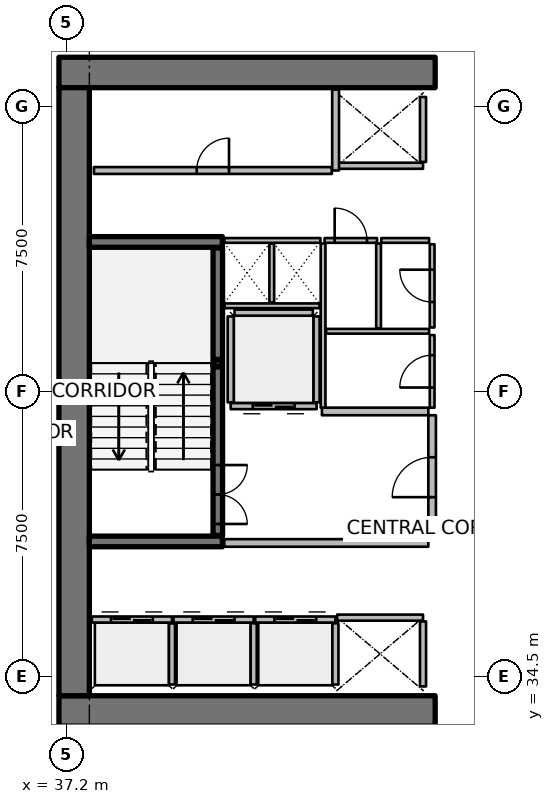
"""IFC4 building model, lengths in metres.
Left out: names, types, materials, properties, quantities, classifications, styles, units other than length and angle.
Written with IfcOpenShell. Run it as: python <this file> out.ifc"""

import sys

from ifc_helpers import new_model, si_unit, direction, frame, frame_2d, origin, origin_2d, place, context, subcontext, project, spatial, rectangle, hollow_rectangle, extrude, element, fill, save


model = new_model("IFC4")
c1 = context("Model", 3, precision=1e-05, world=origin(), true_north=direction((0.0, 1.0)))
c2 = subcontext(c1, "Body", "Model", "MODEL_VIEW")
j1 = project(units=[si_unit("LENGTHUNIT", "METRE"), si_unit("PLANEANGLEUNIT", "RADIAN")], contexts=[c1])
p1 = place(None, origin())
s1 = spatial("IfcSite", under=j1, at=p1, CompositionType="ELEMENT")
p2 = place(p1, origin())
s2 = spatial("IfcBuilding", under=s1, at=p2, CompositionType="ELEMENT")
p3 = place(p2, frame((0.0, 0.0, 75.15)))
s3 = spatial("IfcBuildingStorey", under=s2, at=p3, CompositionType="ELEMENT", Elevation=75.15)
for number, where, z_axis, x_axis in (
    (1, (37.0, 33.6, 0.0), (0.0, 0.0, 1.0), (1.0, 0.0, 0.0)),
    (2, (37.0, 50.4, 0.0), (0.0, 0.0, 1.0), (1.0, 0.0, 0.0)),
):
    element("IfcWall", number, at=place(p3, frame(where, z_axis=z_axis, x_axis=x_axis)), inside=s3, PredefinedType="SHEAR", context=c2, shape_type="SweptSolid", body=[
        extrude(rectangle(XDim=9.9, YDim=0.8, at=frame_2d((4.95, 0.0))), origin(), (0.0, 0.0, 1.0), 3.75),
    ])
p4 = place(p3, frame((37.4, 34.0, 0.0), z_axis=(0.0, 0.0, 1.0), x_axis=(0.0, 1.0, 0.0)))
e3 = element("IfcWall", 3, at=p4, inside=s3, PredefinedType="SHEAR", context=c2, shape_type="SweptSolid", body=[
    extrude(rectangle(XDim=16.0, YDim=0.8, at=frame_2d((8.0, 0.0))), origin(), (0.0, 0.0, 1.0), 3.75),
])
for number, where, z_axis, x_axis in (
    (4, (37.8, 38.06, 0.0), (0.0, 0.0, 1.0), (1.0, 0.0, 0.0)),
    (5, (37.8, 45.94, 0.0), (0.0, 0.0, 1.0), (1.0, 0.0, 0.0)),
):
    element("IfcWall", number, at=place(p3, frame(where, z_axis=z_axis, x_axis=x_axis)), inside=s3, PredefinedType="SHEAR", context=c2, shape_type="SweptSolid", body=[
        extrude(rectangle(XDim=3.5, YDim=0.28, at=frame_2d((1.75, 0.0))), origin(), (0.0, 0.0, 1.0), 3.75),
    ])
p5 = place(p3, frame((41.18, 42.75, 0.0), z_axis=(0.0, 0.0, 1.0), x_axis=(1.0, 0.0, 0.0)))
e6 = element("IfcColumn", 6, at=p5, inside=s3, PredefinedType="COLUMN", context=c2, shape_type="SweptSolid", body=[
    extrude(hollow_rectangle(XDim=0.2, YDim=0.2, WallThickness=0.01, InnerFilletRadius=0.01, OuterFilletRadius=0.02, at=origin_2d()), origin(), (0.0, 0.0, 1.0), 1.67),
])
p6 = place(p3, frame((41.18, 38.22, 0.0), z_axis=(0.0, 0.0, 1.0), x_axis=(0.0, 1.0, 0.0)))
e7 = element("IfcWall", 7, at=p6, inside=s3, PredefinedType="SOLIDWALL", context=c2, shape_type="SweptSolid", body=[
    extrude(rectangle(XDim=7.56, YDim=0.25, at=frame_2d((3.78, 0.0))), origin(), (0.0, 0.0, 1.0), 3.5),
])
p7 = place(p6, frame((0.3, 0.0, 0.0)))
e8 = element("IfcOpeningElement", 8, at=p7, cuts=e7, PredefinedType="OPENING", context=c2, shape_type="SweptSolid", body=[
    extrude(rectangle(XDim=1.55, YDim=2.15, at=frame_2d((0.775, 1.075))), frame((0.0, 0.135, 0.0), z_axis=(0.0, -1.0, 0.0), x_axis=(1.0, 0.0, 0.0)), (0.0, 0.0, 1.0), 0.27),
])
p8 = place(p3, frame((37.865, 36.005, 0.0), z_axis=(0.0, 0.0, 1.0), x_axis=(1.0, 0.0, 0.0)))
e9 = element("IfcWall", 9, at=p8, inside=s3, PredefinedType="PARTITIONING", context=c2, shape_type="SweptSolid", body=[
    extrude(rectangle(XDim=2.11, YDim=0.16, at=frame_2d((1.055, 0.0))), origin(), (0.0, 0.0, 1.0), 3.5),
])
p9 = place(p8, frame((0.505, 0.0, 0.0)))
e10 = element("IfcOpeningElement", 10, at=p9, cuts=e9, PredefinedType="OPENING", context=c2, shape_type="SweptSolid", body=[
    extrude(rectangle(XDim=1.1, YDim=2.1, at=frame_2d((0.55, 1.05))), frame((0.0, 0.09, 0.0), z_axis=(0.0, -1.0, 0.0), x_axis=(1.0, 0.0, 0.0)), (0.0, 0.0, 1.0), 0.18),
])
p10 = place(p3, frame((39.975, 34.295, 0.0), z_axis=(0.0, 0.0, 1.0), x_axis=(0.0, 1.0, 0.0)))
e11 = element("IfcWall", 11, at=p10, inside=s3, PredefinedType="PARTITIONING", context=c2, shape_type="SweptSolid", body=[
    extrude(rectangle(XDim=1.61, YDim=0.16, at=frame_2d((0.805, 0.0))), origin(), (0.0, 0.0, 1.0), 3.5),
])
p11 = place(p3, frame((40.015, 36.005, 0.0), z_axis=(0.0, 0.0, 1.0), x_axis=(1.0, 0.0, 0.0)))
e12 = element("IfcWall", 12, at=p11, inside=s3, PredefinedType="PARTITIONING", context=c2, shape_type="SweptSolid", body=[
    extrude(rectangle(XDim=2.11, YDim=0.16, at=frame_2d((1.055, 0.0))), origin(), (0.0, 0.0, 1.0), 3.5),
])
p12 = place(p11, frame((0.505, 0.0, 0.0)))
e13 = element("IfcOpeningElement", 13, at=p12, cuts=e12, PredefinedType="OPENING", context=c2, shape_type="SweptSolid", body=[
    extrude(rectangle(XDim=1.1, YDim=2.1, at=frame_2d((0.55, 1.05))), frame((0.0, 0.09, 0.0), z_axis=(0.0, -1.0, 0.0), x_axis=(1.0, 0.0, 0.0)), (0.0, 0.0, 1.0), 0.18),
])
p13 = place(p3, frame((42.125, 34.295, 0.0), z_axis=(0.0, 0.0, 1.0), x_axis=(0.0, 1.0, 0.0)))
e14 = element("IfcWall", 14, at=p13, inside=s3, PredefinedType="PARTITIONING", context=c2, shape_type="SweptSolid", body=[
    extrude(rectangle(XDim=1.61, YDim=0.16, at=frame_2d((0.805, 0.0))), origin(), (0.0, 0.0, 1.0), 3.5),
])
p14 = place(p3, frame((42.165, 36.005, 0.0), z_axis=(0.0, 0.0, 1.0), x_axis=(1.0, 0.0, 0.0)))
e15 = element("IfcWall", 15, at=p14, inside=s3, PredefinedType="PARTITIONING", context=c2, shape_type="SweptSolid", body=[
    extrude(rectangle(XDim=2.11, YDim=0.16, at=frame_2d((1.055, 0.0))), origin(), (0.0, 0.0, 1.0), 3.5),
])
p15 = place(p14, frame((0.505, 0.0, 0.0)))
e16 = element("IfcOpeningElement", 16, at=p15, cuts=e15, PredefinedType="OPENING", context=c2, shape_type="SweptSolid", body=[
    extrude(rectangle(XDim=1.1, YDim=2.1, at=frame_2d((0.55, 1.05))), frame((0.0, 0.09, 0.0), z_axis=(0.0, -1.0, 0.0), x_axis=(1.0, 0.0, 0.0)), (0.0, 0.0, 1.0), 0.18),
])
p16 = place(p3, frame((44.275, 34.295, 0.0), z_axis=(0.0, 0.0, 1.0), x_axis=(0.0, 1.0, 0.0)))
e17 = element("IfcWall", 17, at=p16, inside=s3, PredefinedType="PARTITIONING", context=c2, shape_type="SweptSolid", body=[
    extrude(rectangle(XDim=1.61, YDim=0.16, at=frame_2d((0.805, 0.0))), origin(), (0.0, 0.0, 1.0), 3.5),
])
p17 = place(p3, frame((46.58, 47.945, 0.0), z_axis=(0.0, 0.0, 1.0), x_axis=(-1.0, 0.0, 0.0)))
e18 = element("IfcWall", 18, at=p17, inside=s3, PredefinedType="PARTITIONING", context=c2, shape_type="SweptSolid", body=[
    extrude(rectangle(XDim=2.26, YDim=0.16, at=frame_2d((1.13, 0.0))), origin(), (0.0, 0.0, 1.0), 3.5),
])
p18 = place(p3, frame((46.58, 48.045, 0.0), z_axis=(0.0, 0.0, 1.0), x_axis=(0.0, 1.0, 0.0)))
e19 = element("IfcWall", 19, at=p18, inside=s3, PredefinedType="PARTITIONING", context=c2, shape_type="SweptSolid", body=[
    extrude(rectangle(XDim=1.71, YDim=0.16, at=frame_2d((0.855, 0.0))), origin(), (0.0, 0.0, 1.0), 3.5),
])
p19 = place(p3, frame((44.32, 36.055, 0.0), z_axis=(0.0, 0.0, 1.0), x_axis=(1.0, 0.0, 0.0)))
e20 = element("IfcWall", 20, at=p19, inside=s3, PredefinedType="PARTITIONING", context=c2, shape_type="SweptSolid", body=[
    extrude(rectangle(XDim=2.26, YDim=0.16, at=frame_2d((1.13, 0.0))), origin(), (0.0, 0.0, 1.0), 3.5),
])
p20 = place(p3, frame((46.58, 34.245, 0.0), z_axis=(0.0, 0.0, 1.0), x_axis=(0.0, 1.0, 0.0)))
e21 = element("IfcWall", 21, at=p20, inside=s3, PredefinedType="PARTITIONING", context=c2, shape_type="SweptSolid", body=[
    extrude(rectangle(XDim=1.71, YDim=0.16, at=frame_2d((0.855, 0.0))), origin(), (0.0, 0.0, 1.0), 3.5),
])
p21 = place(p3, frame((43.78, 41.62, 0.0), z_axis=(0.0, 0.0, 1.0), x_axis=(-1.0, 0.0, 0.0)))
e22 = element("IfcWall", 22, at=p21, inside=s3, PredefinedType="PARTITIONING", context=c2, shape_type="SweptSolid", body=[
    extrude(rectangle(XDim=2.26, YDim=0.16, at=frame_2d((1.13, 0.0))), origin(), (0.0, 0.0, 1.0), 3.5),
])
p22 = place(p21, frame((0.58, 0.0, 0.0)))
e23 = element("IfcOpeningElement", 23, at=p22, cuts=e22, PredefinedType="OPENING", context=c2, shape_type="SweptSolid", body=[
    extrude(rectangle(XDim=1.1, YDim=2.1, at=frame_2d((0.55, 1.05))), frame((0.0, 0.09, 0.0), z_axis=(0.0, -1.0, 0.0), x_axis=(1.0, 0.0, 0.0)), (0.0, 0.0, 1.0), 0.18),
])
for number, where, z_axis, x_axis in (
    (24, (43.78, 41.72, 0.0), (0.0, 0.0, 1.0), (0.0, 1.0, 0.0)),
    (25, (41.52, 41.72, 0.0), (0.0, 0.0, 1.0), (0.0, 1.0, 0.0)),
):
    element("IfcWall", number, at=place(p3, frame(where, z_axis=z_axis, x_axis=x_axis)), inside=s3, PredefinedType="PARTITIONING", context=c2, shape_type="SweptSolid", body=[
        extrude(rectangle(XDim=2.26, YDim=0.16, at=frame_2d((1.13, 0.0))), origin(), (0.0, 0.0, 1.0), 3.5),
    ])
p23 = place(p3, frame((41.62, 44.08, 0.0), z_axis=(0.0, 0.0, 1.0), x_axis=(1.0, 0.0, 0.0)))
e26 = element("IfcWall", 26, at=p23, inside=s3, PredefinedType="PARTITIONING", context=c2, shape_type="SweptSolid", body=[
    extrude(rectangle(XDim=2.06, YDim=0.16, at=frame_2d((1.03, 0.0))), origin(), (0.0, 0.0, 1.0), 3.5),
])
p24 = place(p3, frame((37.92, 47.82, 0.0), z_axis=(0.0, 0.0, 1.0), x_axis=(1.0, 0.0, 0.0)))
e27 = element("IfcWall", 27, at=p24, inside=s3, PredefinedType="PARTITIONING", context=c2, shape_type="SweptSolid", body=[
    extrude(rectangle(XDim=6.26, YDim=0.18, at=frame_2d((3.13, 0.0))), origin(), (0.0, 0.0, 1.0), 3.5),
])
p25 = place(p24, frame((2.705, 0.0, 0.0)))
e28 = element("IfcOpeningElement", 28, at=p25, cuts=e27, PredefinedType="OPENING", context=c2, shape_type="SweptSolid", body=[
    extrude(rectangle(XDim=0.85, YDim=2.06, at=frame_2d((0.425, 1.03))), frame((0.0, 0.1, 0.0), z_axis=(0.0, -1.0, 0.0), x_axis=(1.0, 0.0, 0.0)), (0.0, 0.0, 1.0), 0.2),
])
p26 = place(p3, frame((44.28, 47.82, 0.0), z_axis=(0.0, 0.0, 1.0), x_axis=(0.0, 1.0, 0.0)))
e29 = element("IfcWall", 29, at=p26, inside=s3, PredefinedType="PARTITIONING", context=c2, shape_type="SweptSolid", body=[
    extrude(rectangle(XDim=2.13, YDim=0.18, at=frame_2d((1.065, 0.0))), origin(), (0.0, 0.0, 1.0), 3.5),
])
p27 = place(p3, frame((41.35, 38.02, 0.0), z_axis=(0.0, 0.0, 1.0), x_axis=(1.0, 0.0, 0.0)))
e30 = element("IfcWall", 30, at=p27, inside=s3, PredefinedType="PARTITIONING", context=c2, shape_type="SweptSolid", body=[
    extrude(rectangle(XDim=5.37, YDim=0.2, at=frame_2d((2.685, 0.0))), origin(), (0.0, 0.0, 1.0), 3.5),
])
p28 = place(p3, frame((43.92, 41.48, 0.0), z_axis=(0.0, 0.0, 1.0), x_axis=(1.0, 0.0, 0.0)))
e31 = element("IfcWall", 31, at=p28, inside=s3, PredefinedType="PARTITIONING", context=c2, shape_type="SweptSolid", body=[
    extrude(rectangle(XDim=2.8, YDim=0.2, at=frame_2d((1.4, 0.0))), origin(), (0.0, 0.0, 1.0), 3.5),
])
p29 = place(p3, frame((46.82, 38.12, 0.0), z_axis=(0.0, 0.0, 1.0), x_axis=(0.0, 1.0, 0.0)))
e32 = element("IfcWall", 32, at=p29, inside=s3, PredefinedType="PARTITIONING", context=c2, shape_type="SweptSolid", body=[
    extrude(rectangle(XDim=3.26, YDim=0.2, at=frame_2d((1.63, 0.0))), origin(), (0.0, 0.0, 1.0), 3.5),
])
p30 = place(p29, frame((1.105, 0.0, 0.0)))
e33 = element("IfcOpeningElement", 33, at=p30, cuts=e32, PredefinedType="OPENING", context=c2, shape_type="SweptSolid", body=[
    extrude(rectangle(XDim=1.05, YDim=2.1, at=frame_2d((0.525, 1.05))), frame((0.0, 0.11, 0.0), z_axis=(0.0, -1.0, 0.0), x_axis=(1.0, 0.0, 0.0)), (0.0, 0.0, 1.0), 0.22),
])
p31 = place(p3, frame((41.36, 44.26, 0.0), z_axis=(0.0, 0.0, 1.0), x_axis=(1.0, 0.0, 0.0)))
e34 = element("IfcWall", 34, at=p31, inside=s3, PredefinedType="PARTITIONING", context=c2, shape_type="SweptSolid", body=[
    extrude(rectangle(XDim=2.5, YDim=0.125, at=frame_2d((1.25, 0.0))), origin(), (0.0, 0.0, 1.0), 2.94),
])
p32 = place(p3, frame((42.6, 44.35, 0.0), z_axis=(0.0, 0.0, 1.0), x_axis=(0.0, 1.0, 0.0)))
e35 = element("IfcWall", 35, at=p32, inside=s3, PredefinedType="PARTITIONING", context=c2, shape_type="SweptSolid", body=[
    extrude(rectangle(XDim=1.55, YDim=0.125, at=frame_2d((0.775, 0.0))), origin(), (0.0, 0.0, 1.0), 2.94),
])
p33 = place(p3, frame((43.95, 41.58, 0.0), z_axis=(0.0, 0.0, 1.0), x_axis=(0.0, 1.0, 0.0)))
e36 = element("IfcWall", 36, at=p33, inside=s3, PredefinedType="PARTITIONING", context=c2, shape_type="SweptSolid", body=[
    extrude(rectangle(XDim=4.32, YDim=0.125, at=frame_2d((2.16, 0.0))), origin(), (0.0, 0.0, 1.0), 2.94),
])
p34 = place(p3, frame((44.03, 43.59, 0.0), z_axis=(0.0, 0.0, 1.0), x_axis=(1.0, 0.0, 0.0)))
e37 = element("IfcWall", 37, at=p34, inside=s3, PredefinedType="PARTITIONING", context=c2, shape_type="SweptSolid", body=[
    extrude(rectangle(XDim=2.71, YDim=0.125, at=frame_2d((1.355, 0.0))), origin(), (0.0, 0.0, 1.0), 2.94),
])
p35 = place(p3, frame((45.41, 43.67, 0.0), z_axis=(0.0, 0.0, 1.0), x_axis=(0.0, 1.0, 0.0)))
e38 = element("IfcWall", 38, at=p35, inside=s3, PredefinedType="PARTITIONING", context=c2, shape_type="SweptSolid", body=[
    extrude(rectangle(XDim=2.23, YDim=0.125, at=frame_2d((1.115, 0.0))), origin(), (0.0, 0.0, 1.0), 2.94),
])
p36 = place(p3, frame((46.82, 41.58, 0.0), z_axis=(0.0, 0.0, 1.0), x_axis=(0.0, 1.0, 0.0)))
e39 = element("IfcWall", 39, at=p36, inside=s3, PredefinedType="PARTITIONING", context=c2, shape_type="SweptSolid", body=[
    extrude(rectangle(XDim=1.91, YDim=0.125, at=frame_2d((0.955, 0.0))), origin(), (0.0, 0.0, 1.0), 2.94),
])
p37 = place(p36, frame((0.53, 0.0, 0.0)))
e40 = element("IfcOpeningElement", 40, at=p37, cuts=e39, PredefinedType="OPENING", context=c2, shape_type="SweptSolid", body=[
    extrude(rectangle(XDim=0.85, YDim=2.06, at=frame_2d((0.425, 1.03))), frame((0.0, 0.073, 0.0), z_axis=(0.0, -1.0, 0.0), x_axis=(1.0, 0.0, 0.0)), (0.0, 0.0, 1.0), 0.145),
])
p38 = place(p3, frame((46.82, 43.69, 0.0), z_axis=(0.0, 0.0, 1.0), x_axis=(0.0, 1.0, 0.0)))
e41 = element("IfcWall", 41, at=p38, inside=s3, PredefinedType="PARTITIONING", context=c2, shape_type="SweptSolid", body=[
    extrude(rectangle(XDim=2.19, YDim=0.125, at=frame_2d((1.095, 0.0))), origin(), (0.0, 0.0, 1.0), 2.94),
])
p39 = place(p38, frame((0.67, 0.0, 0.0)))
e42 = element("IfcOpeningElement", 42, at=p39, cuts=e41, PredefinedType="OPENING", context=c2, shape_type="SweptSolid", body=[
    extrude(rectangle(XDim=0.85, YDim=2.06, at=frame_2d((0.425, 1.03))), frame((0.0, 0.073, 0.0), z_axis=(0.0, -1.0, 0.0), x_axis=(1.0, 0.0, 0.0)), (0.0, 0.0, 1.0), 0.145),
])
p40 = place(p3, frame((41.35, 45.98, 0.0), z_axis=(0.0, 0.0, 1.0), x_axis=(1.0, 0.0, 0.0)))
e43 = element("IfcWall", 43, at=p40, inside=s3, PredefinedType="PARTITIONING", context=c2, shape_type="SweptSolid", body=[
    extrude(rectangle(XDim=2.53, YDim=0.125, at=frame_2d((1.265, 0.0))), origin(), (0.0, 0.0, 1.0), 2.94),
])
p41 = place(p3, frame((43.99, 45.98, 0.0), z_axis=(0.0, 0.0, 1.0), x_axis=(1.0, 0.0, 0.0)))
e44 = element("IfcWall", 44, at=p41, inside=s3, PredefinedType="PARTITIONING", context=c2, shape_type="SweptSolid", body=[
    extrude(rectangle(XDim=1.38, YDim=0.125, at=frame_2d((0.69, 0.0))), origin(), (0.0, 0.0, 1.0), 2.94),
])
p42 = place(p41, frame((0.265, 0.0, 0.0)))
e45 = element("IfcOpeningElement", 45, at=p42, cuts=e44, PredefinedType="OPENING", context=c2, shape_type="SweptSolid", body=[
    extrude(rectangle(XDim=0.85, YDim=2.06, at=frame_2d((0.425, 1.03))), frame((0.0, 0.073, 0.0), z_axis=(0.0, -1.0, 0.0), x_axis=(1.0, 0.0, 0.0)), (0.0, 0.0, 1.0), 0.145),
])
p43 = place(p3, frame((45.48, 45.98, 0.0), z_axis=(0.0, 0.0, 1.0), x_axis=(1.0, 0.0, 0.0)))
e46 = element("IfcWall", 46, at=p43, inside=s3, PredefinedType="PARTITIONING", context=c2, shape_type="SweptSolid", body=[
    extrude(rectangle(XDim=1.26, YDim=0.125, at=frame_2d((0.63, 0.0))), origin(), (0.0, 0.0, 1.0), 2.94),
])
p44 = place(p7, origin())
e47 = element("IfcDoor", 47, at=p44, inside=s3, OperationType="DOUBLE_DOOR_SINGLE_SWING", PredefinedType="DOOR", context=c2, shape_type="SweptSolid", body=[
    extrude(rectangle(XDim=1.55, YDim=2.15, at=frame_2d((0.775, 1.075))), frame((0.0, 0.025, 0.0), z_axis=(0.0, -1.0, 0.0), x_axis=(1.0, 0.0, 0.0)), (0.0, 0.0, 1.0), 0.05),
])
fill(e8, e47)
p45 = place(p9, origin())
e48 = element("IfcDoor", 48, at=p45, inside=s3, OperationType="DOUBLE_DOOR_SLIDING", PredefinedType="DOOR", context=c2, shape_type="SweptSolid", body=[
    extrude(rectangle(XDim=1.1, YDim=2.1, at=frame_2d((0.55, 1.05))), frame((0.0, 0.025, 0.0), z_axis=(0.0, -1.0, 0.0), x_axis=(1.0, 0.0, 0.0)), (0.0, 0.0, 1.0), 0.05),
])
fill(e10, e48)
p46 = place(p12, origin())
e49 = element("IfcDoor", 49, at=p46, inside=s3, OperationType="DOUBLE_DOOR_SLIDING", PredefinedType="DOOR", context=c2, shape_type="SweptSolid", body=[
    extrude(rectangle(XDim=1.1, YDim=2.1, at=frame_2d((0.55, 1.05))), frame((0.0, 0.025, 0.0), z_axis=(0.0, -1.0, 0.0), x_axis=(1.0, 0.0, 0.0)), (0.0, 0.0, 1.0), 0.05),
])
fill(e13, e49)
p47 = place(p15, origin())
e50 = element("IfcDoor", 50, at=p47, inside=s3, OperationType="DOUBLE_DOOR_SLIDING", PredefinedType="DOOR", context=c2, shape_type="SweptSolid", body=[
    extrude(rectangle(XDim=1.1, YDim=2.1, at=frame_2d((0.55, 1.05))), frame((0.0, 0.025, 0.0), z_axis=(0.0, -1.0, 0.0), x_axis=(1.0, 0.0, 0.0)), (0.0, 0.0, 1.0), 0.05),
])
fill(e16, e50)
p48 = place(p22, origin())
e51 = element("IfcDoor", 51, at=p48, inside=s3, OperationType="DOUBLE_DOOR_SLIDING", PredefinedType="DOOR", context=c2, shape_type="SweptSolid", body=[
    extrude(rectangle(XDim=1.1, YDim=2.1, at=frame_2d((0.55, 1.05))), frame((0.0, 0.025, 0.0), z_axis=(0.0, -1.0, 0.0), x_axis=(1.0, 0.0, 0.0)), (0.0, 0.0, 1.0), 0.05),
])
fill(e23, e51)
p49 = place(p25, origin())
e52 = element("IfcDoor", 52, at=p49, inside=s3, OperationType="SINGLE_SWING_RIGHT", PredefinedType="DOOR", context=c2, shape_type="SweptSolid", body=[
    extrude(rectangle(XDim=0.85, YDim=2.06, at=frame_2d((0.425, 1.03))), frame((0.0, 0.025, 0.0), z_axis=(0.0, -1.0, 0.0), x_axis=(1.0, 0.0, 0.0)), (0.0, 0.0, 1.0), 0.05),
])
fill(e28, e52)
p50 = place(p30, origin())
e53 = element("IfcDoor", 53, at=p50, inside=s3, OperationType="SINGLE_SWING_LEFT", PredefinedType="DOOR", context=c2, shape_type="SweptSolid", body=[
    extrude(rectangle(XDim=1.05, YDim=2.1, at=frame_2d((0.525, 1.05))), frame((0.0, 0.025, 0.0), z_axis=(0.0, -1.0, 0.0), x_axis=(1.0, 0.0, 0.0)), (0.0, 0.0, 1.0), 0.05),
])
fill(e33, e53)
p51 = place(p37, origin())
e54 = element("IfcDoor", 54, at=p51, inside=s3, OperationType="SINGLE_SWING_LEFT", PredefinedType="DOOR", context=c2, shape_type="SweptSolid", body=[
    extrude(rectangle(XDim=0.85, YDim=2.06, at=frame_2d((0.425, 1.03))), frame((0.0, 0.025, 0.0), z_axis=(0.0, -1.0, 0.0), x_axis=(1.0, 0.0, 0.0)), (0.0, 0.0, 1.0), 0.05),
])
fill(e40, e54)
p52 = place(p39, origin())
e55 = element("IfcDoor", 55, at=p52, inside=s3, OperationType="SINGLE_SWING_RIGHT", PredefinedType="DOOR", context=c2, shape_type="SweptSolid", body=[
    extrude(rectangle(XDim=0.85, YDim=2.06, at=frame_2d((0.425, 1.03))), frame((0.0, 0.025, 0.0), z_axis=(0.0, -1.0, 0.0), x_axis=(1.0, 0.0, 0.0)), (0.0, 0.0, 1.0), 0.05),
])
fill(e42, e55)
p53 = place(p42, origin())
e56 = element("IfcDoor", 56, at=p53, inside=s3, OperationType="SINGLE_SWING_LEFT", PredefinedType="DOOR", context=c2, shape_type="SweptSolid", body=[
    extrude(rectangle(XDim=0.85, YDim=2.06, at=frame_2d((0.425, 1.03))), frame((0.0, 0.025, 0.0), z_axis=(0.0, -1.0, 0.0), x_axis=(1.0, 0.0, 0.0)), (0.0, 0.0, 1.0), 0.05),
])
fill(e45, e56)
save(model, sys.argv[1])
